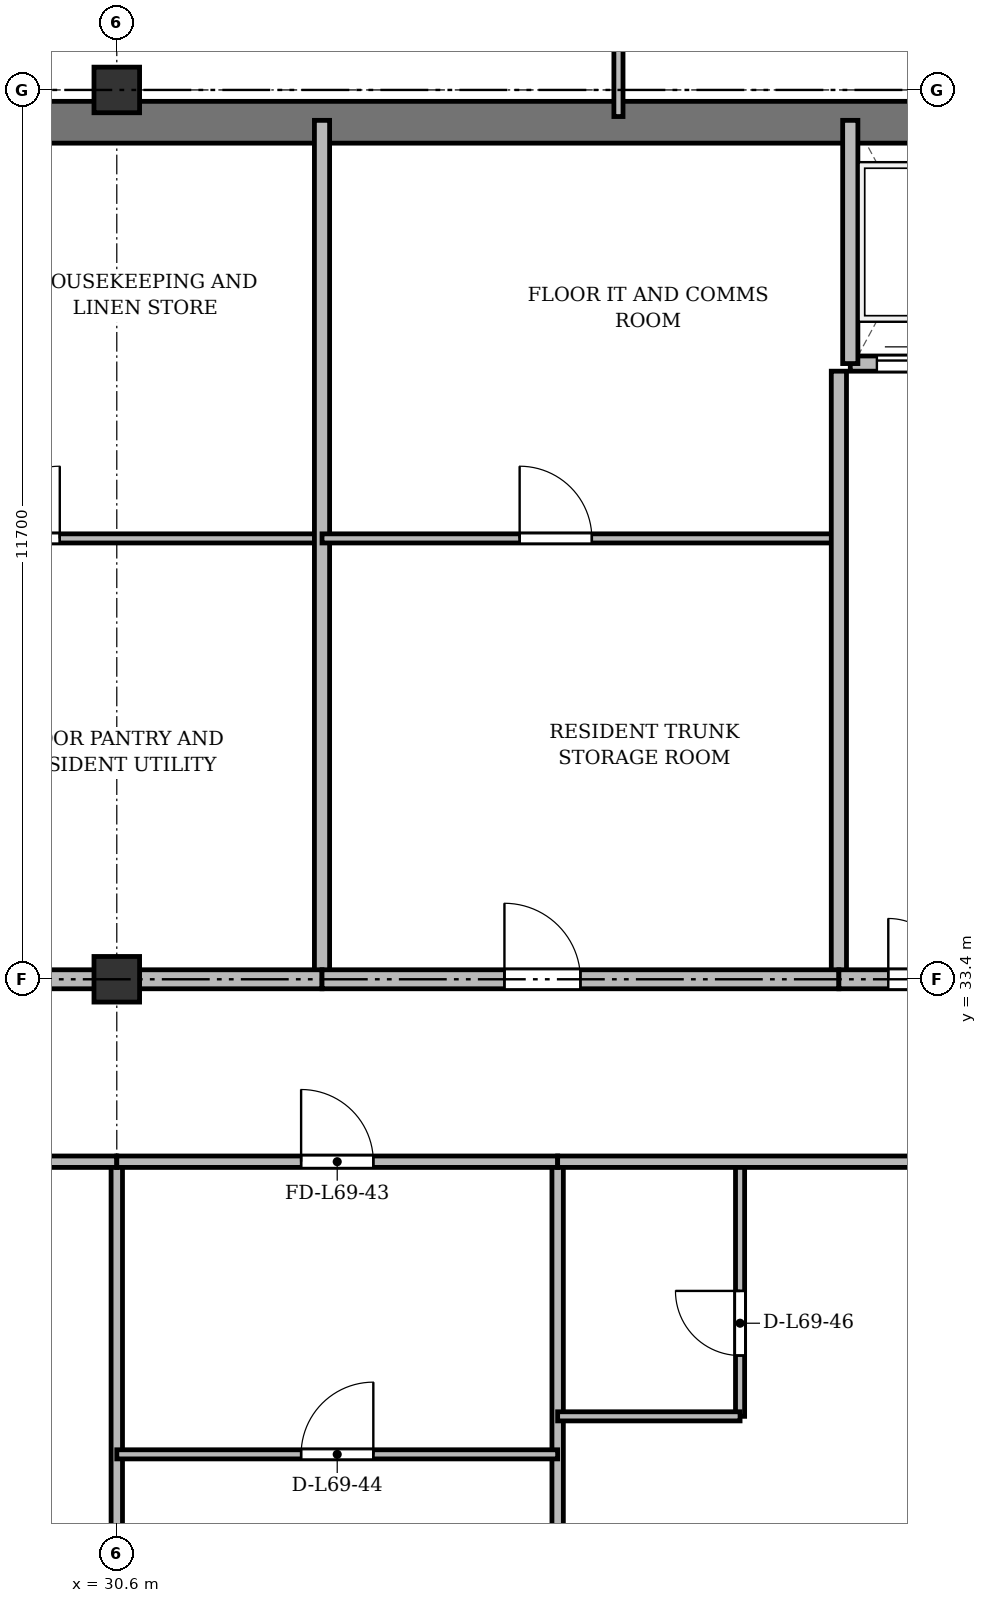
"""IFC4 building model, lengths in metres.
Left out: names, types, materials, properties, quantities, classifications, styles, units other than length and angle.
Written with IfcOpenShell. Run it as: python <this file> out.ifc"""

import sys

from ifc_helpers import new_model, si_unit, direction, frame, frame_2d, origin, origin_2d, place, context, subcontext, project, spatial, rectangle, extrude, source, transform, mapped, element, fill, save


model = new_model("IFC4")
c1 = context("Model", 3, precision=1e-05, world=origin(), true_north=direction((0.0, 1.0)))
c2 = subcontext(c1, "Body", "Model", "MODEL_VIEW")
j1 = project(units=[si_unit("LENGTHUNIT", "METRE"), si_unit("PLANEANGLEUNIT", "RADIAN")], contexts=[c1])
p1 = place(None, origin())
s1 = spatial("IfcSite", under=j1, at=p1, CompositionType="ELEMENT")
p2 = place(p1, origin())
s2 = spatial("IfcBuilding", under=s1, at=p2, CompositionType="ELEMENT")
p3 = place(p2, frame((0.0, 0.0, 266.7)))
s3 = spatial("IfcBuildingStorey", under=s2, at=p3, CompositionType="ELEMENT", Elevation=266.7)
m1 = source(origin(), c2, "Body", "SweptSolid", [
    extrude(rectangle(XDim=0.6, YDim=0.6, at=origin_2d()), origin(), (0.0, 0.0, 1.0), 3.6),
])
for number, where, z_axis, x_axis in (
    (1, (30.6, 33.4, 0.0), (0.0, 0.0, 1.0), (1.0, 0.0, 0.0)),
    (2, (30.6, 45.1, 0.0), (0.0, 0.0, 1.0), (1.0, 0.0, 0.0)),
):
    element("IfcColumn", number, at=place(p3, frame(where, z_axis=z_axis, x_axis=x_axis)), inside=s3, PredefinedType="COLUMN", context=c2, shape_type="MappedRepresentation", body=[
        mapped(m1, transform((0.0, 0.0, 0.0), x_axis=(1.0, 0.0, 0.0), y_axis=(0.0, 1.0, 0.0), z_axis=(0.0, 0.0, 1.0), scale=1.0)),
    ])
p4 = place(p3, frame((15.65, 44.675, 0.0), z_axis=(0.0, 0.0, 1.0), x_axis=(1.0, 0.0, 0.0)))
e3 = element("IfcWall", 3, at=p4, inside=s3, PredefinedType="SHEAR", context=c2, shape_type="SweptSolid", body=[
    extrude(rectangle(XDim=43.1, YDim=0.55, at=frame_2d((21.55, 0.0))), origin(), (0.0, 0.0, 1.0), 3.37),
])
p5 = place(p3, frame((26.3, 39.2, 0.0), z_axis=(0.0, 0.0, 1.0), x_axis=(1.0, 0.0, 0.0)))
e4 = element("IfcWall", 4, at=p5, inside=s3, PredefinedType="PARTITIONING", context=c2, shape_type="SweptSolid", body=[
    extrude(rectangle(XDim=7.0, YDim=0.12, at=frame_2d((3.5, 0.0))), origin(), (0.0, 0.0, 1.0), 2.87),
])
p6 = place(p5, frame((2.6, 0.0, 0.0)))
e5 = element("IfcOpeningElement", 5, at=p6, cuts=e4, PredefinedType="OPENING", context=c2, shape_type="SweptSolid", body=[
    extrude(rectangle(XDim=0.95, YDim=2.15, at=frame_2d((0.475, 1.075))), frame((0.0, 0.07, 0.0), z_axis=(0.0, -1.0, 0.0), x_axis=(1.0, 0.0, 0.0)), (0.0, 0.0, 1.0), 0.14),
])
p7 = place(p3, frame((33.3, 33.4, 0.0), z_axis=(0.0, 0.0, 1.0), x_axis=(0.0, 1.0, 0.0)))
e6 = element("IfcWall", 6, at=p7, inside=s3, PredefinedType="SOLIDWALL", context=c2, shape_type="SweptSolid", body=[
    extrude(rectangle(XDim=11.3, YDim=0.2, at=frame_2d((5.65, 0.0))), origin(), (0.0, 0.0, 1.0), 2.92),
])
p8 = place(p3, frame((33.3, 39.2, 0.0), z_axis=(0.0, 0.0, 1.0), x_axis=(1.0, 0.0, 0.0)))
e7 = element("IfcWall", 7, at=p8, inside=s3, PredefinedType="PARTITIONING", context=c2, shape_type="SweptSolid", body=[
    extrude(rectangle(XDim=6.8, YDim=0.12, at=frame_2d((3.4, 0.0))), origin(), (0.0, 0.0, 1.0), 3.37),
])
p9 = place(p8, frame((2.6, 0.0, 0.0)))
e8 = element("IfcOpeningElement", 8, at=p9, cuts=e7, PredefinedType="OPENING", context=c2, shape_type="SweptSolid", body=[
    extrude(rectangle(XDim=0.95, YDim=2.15, at=frame_2d((0.475, 1.075))), frame((0.0, 0.07, 0.0), z_axis=(0.0, -1.0, 0.0), x_axis=(1.0, 0.0, 0.0)), (0.0, 0.0, 1.0), 0.14),
])
p10 = place(p3, frame((40.1, 33.4, 0.0), z_axis=(0.0, 0.0, 1.0), x_axis=(0.0, 1.0, 0.0)))
e9 = element("IfcWall", 9, at=p10, inside=s3, PredefinedType="SOLIDWALL", context=c2, shape_type="SweptSolid", body=[
    extrude(rectangle(XDim=8.0, YDim=0.2, at=frame_2d((4.0, 0.0))), origin(), (0.0, 0.0, 1.0), 2.92),
])
p11 = place(p3, frame((40.25, 41.5, 0.0), z_axis=(0.0, 0.0, 1.0), x_axis=(1.0, 0.0, 0.0)))
e10 = element("IfcWall", 10, at=p11, inside=s3, PredefinedType="SOLIDWALL", context=c2, shape_type="SweptSolid", body=[
    extrude(rectangle(XDim=6.9, YDim=0.2, at=frame_2d((3.45, 0.0))), origin(), (0.0, 0.0, 1.0), 3.37),
])
p12 = place(p11, frame((0.35, 0.0, 0.0)))
e11 = element("IfcOpeningElement", 11, at=p12, cuts=e10, PredefinedType="OPENING", context=c2, shape_type="SweptSolid", body=[
    extrude(rectangle(XDim=1.05, YDim=2.15, at=frame_2d((0.525, 1.075))), frame((0.0, 0.11, 0.0), z_axis=(0.0, -1.0, 0.0), x_axis=(1.0, 0.0, 0.0)), (0.0, 0.0, 1.0), 0.22),
])
p13 = place(p11, frame((2.05, 0.0, 0.0)))
e12 = element("IfcOpeningElement", 12, at=p13, cuts=e10, PredefinedType="OPENING", context=c2, shape_type="SweptSolid", body=[
    extrude(rectangle(XDim=1.05, YDim=2.15, at=frame_2d((0.525, 1.075))), frame((0.0, 0.11, 0.0), z_axis=(0.0, -1.0, 0.0), x_axis=(1.0, 0.0, 0.0)), (0.0, 0.0, 1.0), 0.22),
])
p14 = place(p11, frame((3.75, 0.0, 0.0)))
e13 = element("IfcOpeningElement", 13, at=p14, cuts=e10, PredefinedType="OPENING", context=c2, shape_type="SweptSolid", body=[
    extrude(rectangle(XDim=1.05, YDim=2.15, at=frame_2d((0.525, 1.075))), frame((0.0, 0.11, 0.0), z_axis=(0.0, -1.0, 0.0), x_axis=(1.0, 0.0, 0.0)), (0.0, 0.0, 1.0), 0.22),
])
p15 = place(p11, frame((5.45, 0.0, 0.0)))
e14 = element("IfcOpeningElement", 14, at=p15, cuts=e10, PredefinedType="OPENING", context=c2, shape_type="SweptSolid", body=[
    extrude(rectangle(XDim=1.05, YDim=2.15, at=frame_2d((0.525, 1.075))), frame((0.0, 0.11, 0.0), z_axis=(0.0, -1.0, 0.0), x_axis=(1.0, 0.0, 0.0)), (0.0, 0.0, 1.0), 0.22),
])
p16 = place(p3, frame((40.25, 41.5, 0.0), z_axis=(0.0, 0.0, 1.0), x_axis=(0.0, 1.0, 0.0)))
e15 = element("IfcWall", 15, at=p16, inside=s3, PredefinedType="SOLIDWALL", context=c2, shape_type="SweptSolid", body=[
    extrude(rectangle(XDim=3.2, YDim=0.2, at=frame_2d((1.6, 0.0))), origin(), (0.0, 0.0, 1.0), 3.37),
])
p17 = place(p3, frame((26.3, 33.4, 0.0), z_axis=(0.0, 0.0, 1.0), x_axis=(1.0, 0.0, 0.0)))
e16 = element("IfcWall", 16, at=p17, inside=s3, PredefinedType="PARTITIONING", context=c2, shape_type="SweptSolid", body=[
    extrude(rectangle(XDim=7.0, YDim=0.25, at=frame_2d((3.5, 0.0))), origin(), (0.0, 0.0, 1.0), 2.92),
])
p18 = place(p17, frame((1.35, 0.0, 0.0)))
e17 = element("IfcOpeningElement", 17, at=p18, cuts=e16, PredefinedType="OPENING", context=c2, shape_type="SweptSolid", body=[
    extrude(rectangle(XDim=0.95, YDim=2.15, at=frame_2d((0.475, 1.075))), frame((0.0, 0.135, 0.0), z_axis=(0.0, -1.0, 0.0), x_axis=(1.0, 0.0, 0.0)), (0.0, 0.0, 1.0), 0.27),
])
p19 = place(p3, frame((33.3, 33.4, 0.0), z_axis=(0.0, 0.0, 1.0), x_axis=(1.0, 0.0, 0.0)))
e18 = element("IfcWall", 18, at=p19, inside=s3, PredefinedType="PARTITIONING", context=c2, shape_type="SweptSolid", body=[
    extrude(rectangle(XDim=6.8, YDim=0.25, at=frame_2d((3.4, 0.0))), origin(), (0.0, 0.0, 1.0), 2.92),
])
p20 = place(p19, frame((2.4, 0.0, 0.0)))
e19 = element("IfcOpeningElement", 19, at=p20, cuts=e18, PredefinedType="OPENING", context=c2, shape_type="SweptSolid", body=[
    extrude(rectangle(XDim=1.0, YDim=2.15, at=frame_2d((0.5, 1.075))), frame((0.0, 0.135, 0.0), z_axis=(0.0, -1.0, 0.0), x_axis=(1.0, 0.0, 0.0)), (0.0, 0.0, 1.0), 0.27),
])
p21 = place(p3, frame((40.1, 33.4, 0.0), z_axis=(0.0, 0.0, 1.0), x_axis=(1.0, 0.0, 0.0)))
e20 = element("IfcWall", 20, at=p21, inside=s3, PredefinedType="PARTITIONING", context=c2, shape_type="SweptSolid", body=[
    extrude(rectangle(XDim=7.05, YDim=0.25, at=frame_2d((3.525, 0.0))), origin(), (0.0, 0.0, 1.0), 2.92),
])
p22 = place(p21, frame((0.65, 0.0, 0.0)))
e21 = element("IfcOpeningElement", 21, at=p22, cuts=e20, PredefinedType="OPENING", context=c2, shape_type="SweptSolid", body=[
    extrude(rectangle(XDim=1.6, YDim=2.2, at=frame_2d((0.8, 1.1))), frame((0.0, 0.135, 0.0), z_axis=(0.0, -1.0, 0.0), x_axis=(1.0, 0.0, 0.0)), (0.0, 0.0, 1.0), 0.27),
])
p23 = place(p3, frame((37.2, 44.75, 0.0), z_axis=(0.0, 0.0, 1.0), x_axis=(0.0, 1.0, 0.0)))
e22 = element("IfcWall", 22, at=p23, inside=s3, PredefinedType="PARTITIONING", context=c2, shape_type="SweptSolid", body=[
    extrude(rectangle(XDim=3.61, YDim=0.12, at=frame_2d((1.805, 0.0))), origin(), (0.0, 0.0, 1.0), 2.92),
])
p24 = place(p23, frame((1.1, 0.0, 0.0)))
e23 = element("IfcOpeningElement", 23, at=p24, cuts=e22, PredefinedType="OPENING", context=c2, shape_type="SweptSolid", body=[
    extrude(rectangle(XDim=0.95, YDim=2.15, at=frame_2d((0.475, 1.075))), frame((0.0, 0.07, 0.0), z_axis=(0.0, -1.0, 0.0), x_axis=(1.0, 0.0, 0.0)), (0.0, 0.0, 1.0), 0.14),
])
p25 = place(p3, frame((30.6, 3.725, 0.0), z_axis=(0.0, 0.0, 1.0), x_axis=(0.0, 1.0, 0.0)))
e24 = element("IfcWall", 24, at=p25, inside=s3, PredefinedType="PARTITIONING", context=c2, shape_type="SweptSolid", body=[
    extrude(rectangle(XDim=27.275, YDim=0.15, at=frame_2d((13.637, 0.0))), origin(), (0.0, 0.0, 1.0), 2.87),
])
p26 = place(p3, frame((36.4, 3.725, 0.0), z_axis=(0.0, 0.0, 1.0), x_axis=(0.0, 1.0, 0.0)))
e25 = element("IfcWall", 25, at=p26, inside=s3, PredefinedType="PARTITIONING", context=c2, shape_type="SweptSolid", body=[
    extrude(rectangle(XDim=27.275, YDim=0.15, at=frame_2d((13.637, 0.0))), origin(), (0.0, 0.0, 1.0), 2.92),
])
p27 = place(p3, frame((23.4, 31.0, 0.0), z_axis=(0.0, 0.0, 1.0), x_axis=(1.0, 0.0, 0.0)))
e26 = element("IfcWall", 26, at=p27, inside=s3, PredefinedType="PARTITIONING", context=c2, shape_type="SweptSolid", body=[
    extrude(rectangle(XDim=7.2, YDim=0.15, at=frame_2d((3.6, 0.0))), origin(), (0.0, 0.0, 1.0), 2.87),
])
p28 = place(p27, frame((4.706, 0.0, 0.0)))
e27 = element("IfcOpeningElement", 27, at=p28, cuts=e26, PredefinedType="OPENING", context=c2, shape_type="SweptSolid", body=[
    extrude(rectangle(XDim=0.95, YDim=2.15, at=frame_2d((0.475, 1.075))), frame((0.0, 0.085, 0.0), z_axis=(0.0, -1.0, 0.0), x_axis=(1.0, 0.0, 0.0)), (0.0, 0.0, 1.0), 0.17),
])
p29 = place(p3, frame((30.6, 31.0, 0.0), z_axis=(0.0, 0.0, 1.0), x_axis=(1.0, 0.0, 0.0)))
e28 = element("IfcWall", 28, at=p29, inside=s3, PredefinedType="PARTITIONING", context=c2, shape_type="SweptSolid", body=[
    extrude(rectangle(XDim=5.8, YDim=0.15, at=frame_2d((2.9, 0.0))), origin(), (0.0, 0.0, 1.0), 2.87),
])
p30 = place(p29, frame((2.425, 0.0, 0.0)))
e29 = element("IfcOpeningElement", 29, at=p30, cuts=e28, PredefinedType="OPENING", context=c2, shape_type="SweptSolid", body=[
    extrude(rectangle(XDim=0.95, YDim=2.15, at=frame_2d((0.475, 1.075))), frame((0.0, 0.085, 0.0), z_axis=(0.0, -1.0, 0.0), x_axis=(1.0, 0.0, 0.0)), (0.0, 0.0, 1.0), 0.17),
])
p31 = place(p3, frame((30.6, 27.15, 0.0), z_axis=(0.0, 0.0, 1.0), x_axis=(1.0, 0.0, 0.0)))
e30 = element("IfcWall", 30, at=p31, inside=s3, PredefinedType="PARTITIONING", context=c2, shape_type="SweptSolid", body=[
    extrude(rectangle(XDim=5.8, YDim=0.12, at=frame_2d((2.9, 0.0))), origin(), (0.0, 0.0, 1.0), 2.87),
])
p32 = place(p31, frame((2.425, 0.0, 0.0)))
e31 = element("IfcOpeningElement", 31, at=p32, cuts=e30, PredefinedType="OPENING", context=c2, shape_type="SweptSolid", body=[
    extrude(rectangle(XDim=0.95, YDim=2.15, at=frame_2d((0.475, 1.075))), frame((0.0, 0.07, 0.0), z_axis=(0.0, -1.0, 0.0), x_axis=(1.0, 0.0, 0.0)), (0.0, 0.0, 1.0), 0.14),
])
p33 = place(p3, frame((38.8, 27.65, 0.0), z_axis=(0.0, 0.0, 1.0), x_axis=(0.0, 1.0, 0.0)))
e32 = element("IfcWall", 32, at=p33, inside=s3, PredefinedType="PARTITIONING", context=c2, shape_type="SweptSolid", body=[
    extrude(rectangle(XDim=3.35, YDim=0.12, at=frame_2d((1.675, 0.0))), origin(), (0.0, 0.0, 1.0), 3.37),
])
p34 = place(p33, frame((0.8, 0.0, 0.0)))
e33 = element("IfcOpeningElement", 33, at=p34, cuts=e32, PredefinedType="OPENING", context=c2, shape_type="SweptSolid", body=[
    extrude(rectangle(XDim=0.85, YDim=2.1, at=frame_2d((0.425, 1.05))), frame((0.0, 0.07, 0.0), z_axis=(0.0, -1.0, 0.0), x_axis=(1.0, 0.0, 0.0)), (0.0, 0.0, 1.0), 0.14),
])
p35 = place(p3, frame((36.4, 27.65, 0.0), z_axis=(0.0, 0.0, 1.0), x_axis=(1.0, 0.0, 0.0)))
e34 = element("IfcWall", 34, at=p35, inside=s3, PredefinedType="PARTITIONING", context=c2, shape_type="SweptSolid", body=[
    extrude(rectangle(XDim=2.4, YDim=0.12, at=frame_2d((1.2, 0.0))), origin(), (0.0, 0.0, 1.0), 3.37),
])
p36 = place(p3, frame((36.4, 31.0, 0.0), z_axis=(0.0, 0.0, 1.0), x_axis=(1.0, 0.0, 0.0)))
e35 = element("IfcWall", 35, at=p36, inside=s3, PredefinedType="PARTITIONING", context=c2, shape_type="SweptSolid", body=[
    extrude(rectangle(XDim=7.4, YDim=0.15, at=frame_2d((3.7, 0.0))), origin(), (0.0, 0.0, 1.0), 2.87),
])
p37 = place(p36, frame((4.967, 0.0, 0.0)))
e36 = element("IfcOpeningElement", 36, at=p37, cuts=e35, PredefinedType="OPENING", context=c2, shape_type="SweptSolid", body=[
    extrude(rectangle(XDim=0.95, YDim=2.15, at=frame_2d((0.475, 1.075))), frame((0.0, 0.085, 0.0), z_axis=(0.0, -1.0, 0.0), x_axis=(1.0, 0.0, 0.0)), (0.0, 0.0, 1.0), 0.17),
])
m2 = source(origin(), c2, "Body", "SweptSolid", [
    extrude(rectangle(XDim=0.95, YDim=2.15, at=frame_2d((0.475, 1.075))), frame((0.0, 0.025, 0.0), z_axis=(0.0, -1.0, 0.0), x_axis=(1.0, 0.0, 0.0)), (0.0, 0.0, 1.0), 0.05),
])
p38 = place(p6, origin())
e37 = element("IfcDoor", 37, at=p38, inside=s3, OperationType="SINGLE_SWING_RIGHT", PredefinedType="DOOR", context=c2, shape_type="MappedRepresentation", body=[
    mapped(m2, transform((0.0, 0.0, 0.0), x_axis=(1.0, 0.0, 0.0), y_axis=(0.0, 1.0, 0.0), z_axis=(0.0, 0.0, 1.0), scale=1.0)),
])
fill(e5, e37)
p39 = place(p9, origin())
e38 = element("IfcDoor", 38, at=p39, inside=s3, OperationType="SINGLE_SWING_LEFT", PredefinedType="DOOR", context=c2, shape_type="MappedRepresentation", body=[
    mapped(m2, transform((0.0, 0.0, 0.0), x_axis=(1.0, 0.0, 0.0), y_axis=(0.0, 1.0, 0.0), z_axis=(0.0, 0.0, 1.0), scale=1.0)),
])
fill(e8, e38)
m3 = source(origin(), c2, "Body", "SweptSolid", [
    extrude(rectangle(XDim=1.05, YDim=2.15, at=frame_2d((0.525, 1.075))), frame((0.0, 0.025, 0.0), z_axis=(0.0, -1.0, 0.0), x_axis=(1.0, 0.0, 0.0)), (0.0, 0.0, 1.0), 0.05),
])
p40 = place(p12, origin())
e39 = element("IfcDoor", 39, at=p40, inside=s3, OperationType="DOUBLE_DOOR_SLIDING", PredefinedType="DOOR", context=c2, shape_type="MappedRepresentation", body=[
    mapped(m3, transform((0.0, 0.0, 0.0), x_axis=(1.0, 0.0, 0.0), y_axis=(0.0, 1.0, 0.0), z_axis=(0.0, 0.0, 1.0), scale=1.0)),
])
fill(e11, e39)
m4 = source(origin(), c2, "Body", "SweptSolid", [
    extrude(rectangle(XDim=1.0, YDim=2.15, at=frame_2d((0.5, 1.075))), frame((0.0, 0.025, 0.0), z_axis=(0.0, -1.0, 0.0), x_axis=(1.0, 0.0, 0.0)), (0.0, 0.0, 1.0), 0.05),
])
p41 = place(p20, origin())
e40 = element("IfcDoor", 40, at=p41, inside=s3, OperationType="SINGLE_SWING_LEFT", PredefinedType="DOOR", context=c2, shape_type="MappedRepresentation", body=[
    mapped(m4, transform((0.0, 0.0, 0.0), x_axis=(1.0, 0.0, 0.0), y_axis=(0.0, 1.0, 0.0), z_axis=(0.0, 0.0, 1.0), scale=1.0)),
])
fill(e19, e40)
m5 = source(origin(), c2, "Body", "SweptSolid", [
    extrude(rectangle(XDim=1.6, YDim=2.2, at=frame_2d((0.8, 1.1))), frame((0.0, 0.025, 0.0), z_axis=(0.0, -1.0, 0.0), x_axis=(1.0, 0.0, 0.0)), (0.0, 0.0, 1.0), 0.05),
])
p42 = place(p22, origin())
e41 = element("IfcDoor", 41, at=p42, inside=s3, OperationType="DOUBLE_DOOR_SINGLE_SWING", PredefinedType="DOOR", context=c2, shape_type="MappedRepresentation", body=[
    mapped(m5, transform((0.0, 0.0, 0.0), x_axis=(1.0, 0.0, 0.0), y_axis=(0.0, 1.0, 0.0), z_axis=(0.0, 0.0, 1.0), scale=1.0)),
])
fill(e21, e41)
p43 = place(p30, origin())
e42 = element("IfcDoor", 42, at=p43, inside=s3, OperationType="SINGLE_SWING_LEFT", PredefinedType="DOOR", context=c2, shape_type="MappedRepresentation", body=[
    mapped(m2, transform((0.0, 0.0, 0.0), x_axis=(1.0, 0.0, 0.0), y_axis=(0.0, 1.0, 0.0), z_axis=(0.0, 0.0, 1.0), scale=1.0)),
])
fill(e29, e42)
p44 = place(p32, origin())
e43 = element("IfcDoor", 43, at=p44, inside=s3, OperationType="SINGLE_SWING_RIGHT", PredefinedType="DOOR", context=c2, shape_type="MappedRepresentation", body=[
    mapped(m2, transform((0.0, 0.0, 0.0), x_axis=(1.0, 0.0, 0.0), y_axis=(0.0, 1.0, 0.0), z_axis=(0.0, 0.0, 1.0), scale=1.0)),
])
fill(e31, e43)
m6 = source(origin(), c2, "Body", "SweptSolid", [
    extrude(rectangle(XDim=0.85, YDim=2.1, at=frame_2d((0.425, 1.05))), frame((0.0, 0.025, 0.0), z_axis=(0.0, -1.0, 0.0), x_axis=(1.0, 0.0, 0.0)), (0.0, 0.0, 1.0), 0.05),
])
p45 = place(p34, origin())
e44 = element("IfcDoor", 44, at=p45, inside=s3, OperationType="SINGLE_SWING_RIGHT", PredefinedType="DOOR", context=c2, shape_type="MappedRepresentation", body=[
    mapped(m6, transform((0.0, 0.0, 0.0), x_axis=(1.0, 0.0, 0.0), y_axis=(0.0, 1.0, 0.0), z_axis=(0.0, 0.0, 1.0), scale=1.0)),
])
fill(e33, e44)
save(model, sys.argv[1])
